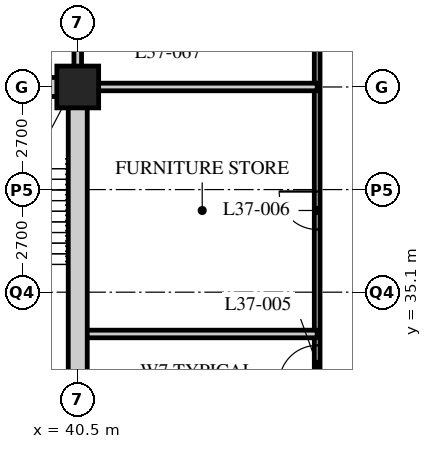
"""IFC4 building model, lengths in metres.
Left out: names, types, materials, properties, quantities, classifications, styles, units other than length and angle.
Written with IfcOpenShell. Run it as: python <this file> out.ifc"""

import sys

from ifc_helpers import new_model, si_unit, direction, frame, frame_2d, origin, origin_2d, place, context, subcontext, project, spatial, rectangle, hollow_rectangle, extrude, element, fill, save


model = new_model("IFC4")
c1 = context("Model", 3, precision=1e-05, world=origin(), true_north=direction((0.0, 1.0)))
c2 = subcontext(c1, "Body", "Model", "MODEL_VIEW")
j1 = project(units=[si_unit("LENGTHUNIT", "METRE"), si_unit("PLANEANGLEUNIT", "RADIAN")], contexts=[c1])
p1 = place(None, origin())
s1 = spatial("IfcSite", under=j1, at=p1, CompositionType="ELEMENT")
p2 = place(p1, origin())
s2 = spatial("IfcBuilding", under=s1, at=p2, CompositionType="ELEMENT")
p3 = place(p2, frame((0.0, 0.0, 144.2)))
s3 = spatial("IfcBuildingStorey", under=s2, at=p3, CompositionType="ELEMENT", Elevation=144.2)
p4 = place(p3, frame((40.5, 40.5, 0.0), z_axis=(0.0, 0.0, 1.0), x_axis=(1.0, 0.0, 0.0)))
e1 = element("IfcColumn", 1, at=p4, inside=s3, PredefinedType="COLUMN", context=c2, shape_type="SweptSolid", body=[
    extrude(hollow_rectangle(XDim=1.1, YDim=1.1, WallThickness=0.1, at=origin_2d()), origin(), (0.0, 0.0, 1.0), 3.4),
])
p5 = place(p3, frame((46.8, 24.3, 0.0), z_axis=(0.0, 0.0, 1.0), x_axis=(0.0, 1.0, 0.0)))
e2 = element("IfcWall", 2, at=p5, inside=s3, PredefinedType="PARTITIONING", context=c2, shape_type="SweptSolid", body=[
    extrude(rectangle(XDim=19.8, YDim=0.15, at=frame_2d((9.9, 0.0))), origin(), (0.0, 0.0, 1.0), 3.19),
])
p6 = place(p5, frame((0.929, 0.0, 0.0)))
e3 = element("IfcOpeningElement", 3, at=p6, cuts=e2, PredefinedType="OPENING", context=c2, shape_type="SweptSolid", body=[
    extrude(rectangle(XDim=1.0, YDim=2.1, at=frame_2d((0.5, 1.05))), frame((0.0, 0.085, 0.0), z_axis=(0.0, -1.0, 0.0), x_axis=(1.0, 0.0, 0.0)), (0.0, 0.0, 1.0), 0.17),
])
p7 = place(p5, frame((4.979, 0.0, 0.0)))
e4 = element("IfcOpeningElement", 4, at=p7, cuts=e2, PredefinedType="OPENING", context=c2, shape_type="SweptSolid", body=[
    extrude(rectangle(XDim=1.0, YDim=2.1, at=frame_2d((0.5, 1.05))), frame((0.0, 0.085, 0.0), z_axis=(0.0, -1.0, 0.0), x_axis=(1.0, 0.0, 0.0)), (0.0, 0.0, 1.0), 0.17),
])
p8 = place(p5, frame((8.4, 0.0, 0.0)))
e5 = element("IfcOpeningElement", 5, at=p8, cuts=e2, PredefinedType="OPENING", context=c2, shape_type="SweptSolid", body=[
    extrude(rectangle(XDim=1.0, YDim=2.1, at=frame_2d((0.5, 1.05))), frame((0.0, 0.085, 0.0), z_axis=(0.0, -1.0, 0.0), x_axis=(1.0, 0.0, 0.0)), (0.0, 0.0, 1.0), 0.17),
])
p9 = place(p5, frame((12.45, 0.0, 0.0)))
e6 = element("IfcOpeningElement", 6, at=p9, cuts=e2, PredefinedType="OPENING", context=c2, shape_type="SweptSolid", body=[
    extrude(rectangle(XDim=1.0, YDim=2.1, at=frame_2d((0.5, 1.05))), frame((0.0, 0.085, 0.0), z_axis=(0.0, -1.0, 0.0), x_axis=(1.0, 0.0, 0.0)), (0.0, 0.0, 1.0), 0.17),
])
p10 = place(p3, frame((46.8, 34.0, 0.0), z_axis=(0.0, 0.0, 1.0), x_axis=(-1.0, 0.0, 0.0)))
e7 = element("IfcWall", 7, at=p10, inside=s3, PredefinedType="SOLIDWALL", context=c2, shape_type="SweptSolid", body=[
    extrude(rectangle(XDim=6.3, YDim=0.2, at=frame_2d((3.15, 0.0))), origin(), (0.0, 0.0, 1.0), 3.19),
])
p11 = place(p3, frame((40.5, 40.5, 0.0), z_axis=(0.0, 0.0, 1.0), x_axis=(0.0, 1.0, 0.0)))
e8 = element("IfcWall", 8, at=p11, inside=s3, PredefinedType="SOLIDWALL", context=c2, shape_type="SweptSolid", body=[
    extrude(rectangle(XDim=3.6, YDim=0.2, at=frame_2d((1.8, 0.0))), origin(), (0.0, 0.0, 1.0), 2.42),
])
p12 = place(p3, frame((40.5, 40.5, 0.0), z_axis=(0.0, 0.0, 1.0), x_axis=(1.0, 0.0, 0.0)))
e9 = element("IfcWall", 9, at=p12, inside=s3, PredefinedType="SOLIDWALL", context=c2, shape_type="SweptSolid", body=[
    extrude(rectangle(XDim=6.3, YDim=0.2, at=frame_2d((3.15, 0.0))), origin(), (0.0, 0.0, 1.0), 3.19),
])
p13 = place(p3, frame((15.95, 40.5, 0.0), z_axis=(0.0, 0.0, 1.0), x_axis=(1.0, 0.0, 0.0)))
e10 = element("IfcWall", 10, at=p13, inside=s3, PredefinedType="SOLIDWALL", context=c2, shape_type="SweptSolid", body=[
    extrude(rectangle(XDim=24.8, YDim=0.5, at=frame_2d((12.4, 0.0))), origin(), (0.0, 0.0, 1.0), 2.42),
])
p14 = place(p13, frame((11.5, 0.0, 0.0)))
e11 = element("IfcOpeningElement", 11, at=p14, cuts=e10, PredefinedType="OPENING", context=c2, shape_type="SweptSolid", body=[
    extrude(rectangle(XDim=1.8, YDim=2.4, at=frame_2d((0.9, 1.2))), frame((0.0, 0.26, 0.0), z_axis=(0.0, -1.0, 0.0), x_axis=(1.0, 0.0, 0.0)), (0.0, 0.0, 1.0), 0.52),
])
p15 = place(p3, frame((40.5, 24.55, 0.0), z_axis=(0.0, 0.0, 1.0), x_axis=(0.0, 1.0, 0.0)))
e12 = element("IfcWall", 12, at=p15, inside=s3, PredefinedType="SOLIDWALL", context=c2, shape_type="SweptSolid", body=[
    extrude(rectangle(XDim=15.7, YDim=0.5, at=frame_2d((7.85, 0.0))), origin(), (0.0, 0.0, 1.0), 2.42),
])
p16 = place(p8, origin())
e13 = element("IfcDoor", 13, at=p16, inside=s3, OperationType="SINGLE_SWING_LEFT", PredefinedType="DOOR", context=c2, shape_type="SweptSolid", body=[
    extrude(rectangle(XDim=1.0, YDim=2.1, at=frame_2d((0.5, 1.05))), frame((0.0, 0.025, 0.0), z_axis=(0.0, -1.0, 0.0), x_axis=(1.0, 0.0, 0.0)), (0.0, 0.0, 1.0), 0.05),
])
fill(e5, e13)
p17 = place(p9, origin())
e14 = element("IfcDoor", 14, at=p17, inside=s3, OperationType="SINGLE_SWING_RIGHT", PredefinedType="DOOR", context=c2, shape_type="SweptSolid", body=[
    extrude(rectangle(XDim=1.0, YDim=2.1, at=frame_2d((0.5, 1.05))), frame((0.0, 0.025, 0.0), z_axis=(0.0, -1.0, 0.0), x_axis=(1.0, 0.0, 0.0)), (0.0, 0.0, 1.0), 0.05),
])
fill(e6, e14)
save(model, sys.argv[1])
